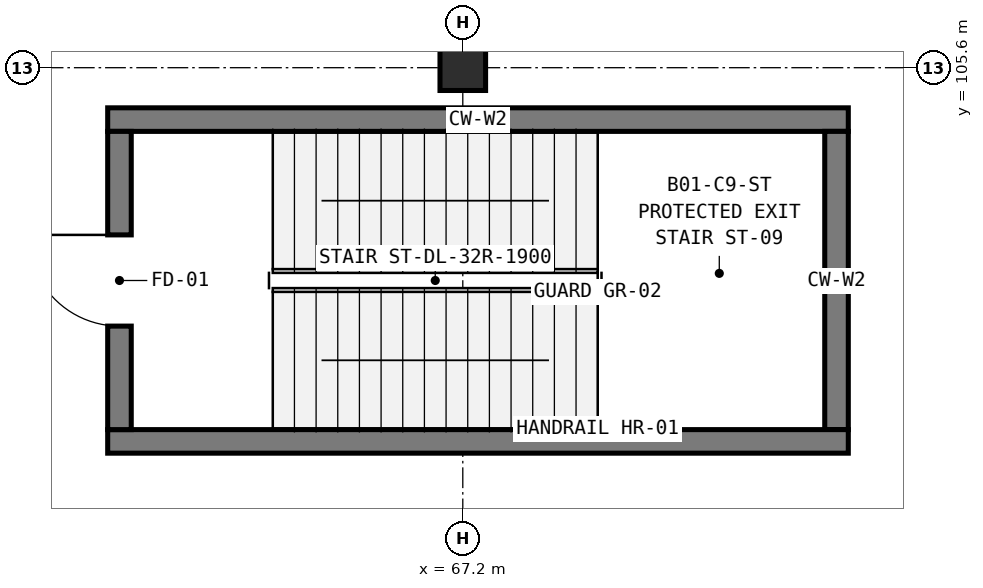
"""IFC4 building model, lengths in metres.
Left out: names, types, materials, properties, quantities, classifications, styles, units other than length and angle.
Written with IfcOpenShell. Run it as: python <this file> out.ifc"""

import sys

from ifc_helpers import new_model, si_unit, direction, frame, frame_2d, origin, origin_2d, place, context, subcontext, project, spatial, rectangle, extrude, element, fill, save


model = new_model("IFC4")
c1 = context("Model", 3, precision=1e-05, world=origin(), true_north=direction((0.0, 1.0)))
c2 = subcontext(c1, "Body", "Model", "MODEL_VIEW")
j1 = project(units=[si_unit("LENGTHUNIT", "METRE"), si_unit("PLANEANGLEUNIT", "RADIAN")], contexts=[c1])
p1 = place(None, origin())
s1 = spatial("IfcSite", under=j1, at=p1, CompositionType="ELEMENT")
p2 = place(p1, origin())
s2 = spatial("IfcBuilding", under=s1, at=p2, CompositionType="ELEMENT")
p3 = place(p2, frame((0.0, 0.0, -5.4)))
s3 = spatial("IfcBuildingStorey", under=s2, at=p3, CompositionType="ELEMENT", Elevation=-5.4)
p4 = place(p3, frame((67.2, 105.6, 0.0), z_axis=(0.0, 0.0, 1.0), x_axis=(1.0, 0.0, 0.0)))
e1 = element("IfcColumn", 1, at=p4, inside=s3, PredefinedType="COLUMN", context=c2, shape_type="SweptSolid", body=[
    extrude(rectangle(XDim=0.6, YDim=0.6, at=origin_2d()), origin(), (0.0, 0.0, 1.0), 5.4),
])
p5 = place(p3, frame((62.528, 104.917, 0.0), z_axis=(0.0, 0.0, 1.0), x_axis=(1.0, 0.0, 0.0)))
e2 = element("IfcWall", 2, at=p5, inside=s3, PredefinedType="SHEAR", context=c2, shape_type="SweptSolid", body=[
    extrude(rectangle(XDim=9.744, YDim=0.31, at=frame_2d((4.872, 0.0))), origin(), (0.0, 0.0, 1.0), 5.06),
])
p6 = place(p3, frame((72.117, 104.762, 0.0), z_axis=(0.0, 0.0, 1.0), x_axis=(0.0, -1.0, 0.0)))
e3 = element("IfcWall", 3, at=p6, inside=s3, PredefinedType="SHEAR", context=c2, shape_type="SweptSolid", body=[
    extrude(rectangle(XDim=3.924, YDim=0.31, at=frame_2d((1.962, 0.0))), origin(), (0.0, 0.0, 1.0), 5.06),
])
p7 = place(p3, frame((72.272, 100.683, 0.0), z_axis=(0.0, 0.0, 1.0), x_axis=(-1.0, 0.0, 0.0)))
e4 = element("IfcWall", 4, at=p7, inside=s3, PredefinedType="SHEAR", context=c2, shape_type="SweptSolid", body=[
    extrude(rectangle(XDim=9.744, YDim=0.31, at=frame_2d((4.872, 0.0))), origin(), (0.0, 0.0, 1.0), 5.06),
])
p8 = place(p3, frame((62.683, 100.838, 0.0), z_axis=(0.0, 0.0, 1.0), x_axis=(0.0, 1.0, 0.0)))
e5 = element("IfcWall", 5, at=p8, inside=s3, PredefinedType="SHEAR", context=c2, shape_type="SweptSolid", body=[
    extrude(rectangle(XDim=3.924, YDim=0.31, at=frame_2d((1.962, 0.0))), origin(), (0.0, 0.0, 1.0), 5.06),
])
p9 = place(p8, frame((1.362, 0.0, 0.0)))
e6 = element("IfcOpeningElement", 6, at=p9, cuts=e5, PredefinedType="OPENING", context=c2, shape_type="SweptSolid", body=[
    extrude(rectangle(XDim=1.2, YDim=2.2, at=frame_2d((0.6, 1.1))), frame((0.0, 0.165, 0.0), z_axis=(0.0, -1.0, 0.0), x_axis=(1.0, 0.0, 0.0)), (0.0, 0.0, 1.0), 0.33),
])
p10 = place(p9, origin())
e7 = element("IfcDoor", 7, at=p10, inside=s3, OperationType="SINGLE_SWING_RIGHT", PredefinedType="DOOR", context=c2, shape_type="SweptSolid", body=[
    extrude(rectangle(XDim=1.2, YDim=2.2, at=frame_2d((0.6, 1.1))), frame((0.0, 0.025, 0.0), z_axis=(0.0, -1.0, 0.0), x_axis=(1.0, 0.0, 0.0)), (0.0, 0.0, 1.0), 0.05),
])
fill(e6, e7)
save(model, sys.argv[1])
